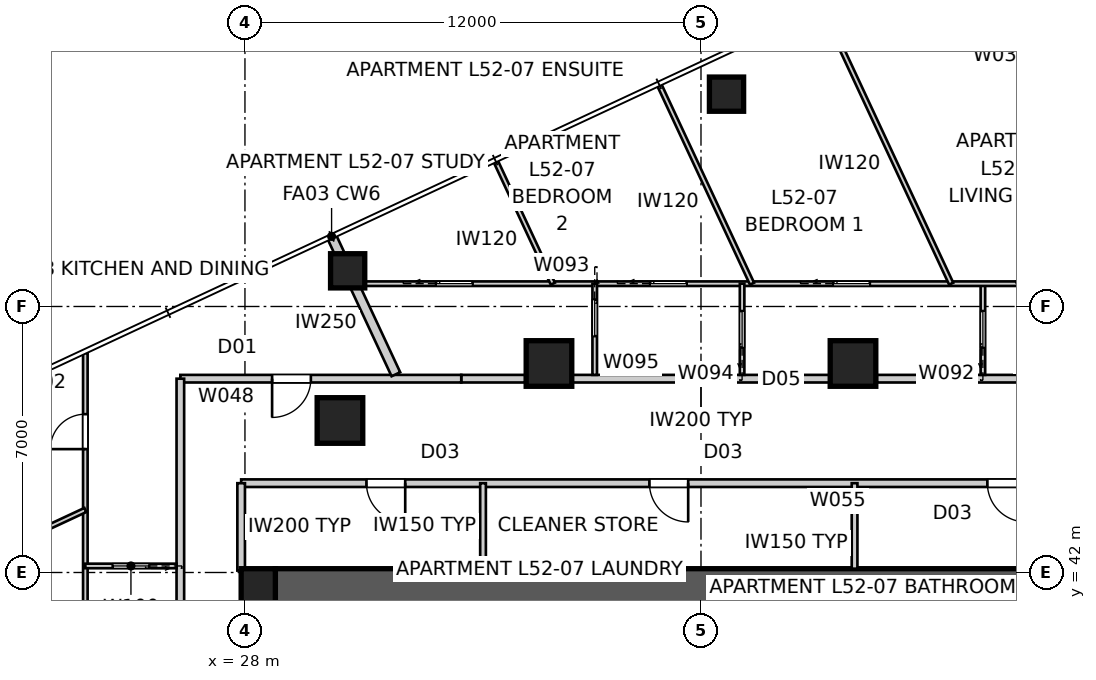
"""IFC4 building model, lengths in metres.
Left out: names, types, materials, properties, quantities, classifications, styles, units other than length and angle.
Written with IfcOpenShell. Run it as: python <this file> out.ifc"""

import sys

from ifc_helpers import new_model, si_unit, direction, frame, frame_2d, origin, origin_2d, place, context, subcontext, project, spatial, polyline, rectangle, outline, extrude, element, fill, save


model = new_model("IFC4")
c1 = context("Model", 3, precision=1e-05, world=origin(), true_north=direction((0.0, 1.0)))
c2 = subcontext(c1, "Body", "Model", "MODEL_VIEW")
j1 = project(units=[si_unit("LENGTHUNIT", "METRE"), si_unit("PLANEANGLEUNIT", "RADIAN")], contexts=[c1])
p1 = place(None, origin())
s1 = spatial("IfcSite", under=j1, at=p1, CompositionType="ELEMENT")
p2 = place(p1, origin())
s2 = spatial("IfcBuilding", under=s1, at=p2, CompositionType="ELEMENT")
p3 = place(p2, frame((0.0, 0.0, 189.6)))
s3 = spatial("IfcBuildingStorey", under=s2, at=p3, CompositionType="ELEMENT", Elevation=189.6)
p4 = place(p3, frame((28.8, 41.65, 0.0), z_axis=(0.0, 0.0, 1.0), x_axis=(1.0, 0.0, 0.0)))
e1 = element("IfcWall", 1, at=p4, inside=s3, PredefinedType="SHEAR", context=c2, shape_type="SweptSolid", body=[
    extrude(outline(polyline([(0.0, -0.45), (22.4, -0.45), (22.4, -0.025), (22.85, -0.025), (22.85, 0.025), (22.4, 0.025), (22.4, 0.45), (0.0, 0.45), (0.0, 0.025), (-0.45, 0.025), (-0.45, -0.025), (0.0, -0.025), (0.0, -0.45)])), origin(), (0.0, 0.0, 1.0), 3.4),
])
p5 = place(p3, frame((28.35, 41.2, 0.0), z_axis=(0.0, 0.0, 1.0), x_axis=(0.0, -1.0, 0.0)))
e2 = element("IfcWall", 2, at=p5, inside=s3, PredefinedType="SHEAR", context=c2, shape_type="SweptSolid", body=[
    extrude(outline(polyline([(0.0, -0.45), (22.4, -0.45), (22.4, -0.025), (22.85, -0.025), (22.85, 0.025), (22.4, 0.025), (22.4, 0.45), (0.0, 0.45), (0.0, 0.025), (-0.45, 0.025), (-0.45, -0.025), (0.0, -0.025), (0.0, -0.45)])), origin(), (0.0, 0.0, 1.0), 3.4),
])
p6 = place(p5, frame((11.14, 0.0, 0.0)))
e3 = element("IfcOpeningElement", 3, at=p6, cuts=e2, PredefinedType="OPENING", context=c2, shape_type="SweptSolid", body=[
    extrude(rectangle(XDim=1.02, YDim=2.4, at=frame_2d((0.51, 1.2))), frame((0.0, 0.46, 0.0), z_axis=(0.0, -1.0, 0.0), x_axis=(1.0, 0.0, 0.0)), (0.0, 0.0, 1.0), 0.92),
])
for number, where, z_axis, x_axis in (
    (4, (28.35, 41.65, 0.0), (0.0, 0.0, 1.0), (1.0, 0.0, 0.0)),
    (5, (40.672, 54.588, 0.0), (0.0, 0.0, 1.0), (1.0, 0.0, 0.0)),
    (6, (30.702, 49.939, 0.0), (0.0, 0.0, 1.0), (1.0, 0.0, 0.0)),
):
    element("IfcColumn", number, at=place(p3, frame(where, z_axis=z_axis, x_axis=x_axis)), inside=s3, PredefinedType="COLUMN", context=c2, shape_type="SweptSolid", body=[
        extrude(rectangle(XDim=0.9, YDim=0.9, at=origin_2d()), origin(), (0.0, 0.0, 1.0), 3.4),
    ])
for number, where, z_axis, x_axis in (
    (7, (44.0, 47.5, 0.0), (0.0, 0.0, 1.0), (1.0, 0.0, 0.0)),
    (8, (36.0, 47.5, 0.0), (0.0, 0.0, 1.0), (1.0, 0.0, 0.0)),
    (9, (30.5, 46.0, 0.0), (0.0, 0.0, 1.0), (1.0, 0.0, 0.0)),
):
    element("IfcColumn", number, at=place(p3, frame(where, z_axis=z_axis, x_axis=x_axis)), inside=s3, PredefinedType="COLUMN", context=c2, shape_type="SweptSolid", body=[
        extrude(rectangle(XDim=1.2, YDim=1.2, at=origin_2d()), origin(), (0.0, 0.0, 1.0), 3.4),
    ])
p7 = place(p3, frame((49.19, 55.25, 0.0), z_axis=(0.0, 0.0, 1.0), x_axis=(-0.422658246362, 0.906289140828, 0.0)))
e10 = element("IfcWall", 10, at=p7, inside=s3, PredefinedType="SOLIDWALL", context=c2, shape_type="SweptSolid", body=[
    extrude(rectangle(XDim=4.0, YDim=0.2, at=frame_2d((2.0, 0.0))), origin(), (0.0, 0.0, 1.0), 3.25),
])
p8 = place(p7, frame((1.0, 0.0, 0.45)))
e11 = element("IfcOpeningElement", 11, at=p8, cuts=e10, PredefinedType="OPENING", context=c2, shape_type="SweptSolid", body=[
    extrude(rectangle(XDim=2.0, YDim=1.8, at=frame_2d((1.0, 0.9))), frame((0.0, 0.11, 0.0), z_axis=(0.0, -1.0, 0.0), x_axis=(1.0, 0.0, 0.0)), (0.0, 0.0, 1.0), 0.22),
])
p9 = place(p3, frame((53.7, 47.1, 0.0), z_axis=(0.0, 0.0, 1.0), x_axis=(-1.0, 0.0, 0.0)))
e12 = element("IfcWall", 12, at=p9, inside=s3, PredefinedType="PARTITIONING", context=c2, shape_type="SweptSolid", body=[
    extrude(rectangle(XDim=7.392, YDim=0.2, at=frame_2d((3.696, 0.0))), origin(), (0.0, 0.0, 1.0), 3.25),
])
p10 = place(p9, frame((2.506, 0.0, 0.0)))
e13 = element("IfcOpeningElement", 13, at=p10, cuts=e12, PredefinedType="OPENING", context=c2, shape_type="SweptSolid", body=[
    extrude(rectangle(XDim=1.02, YDim=2.34, at=frame_2d((0.51, 1.17))), frame((0.0, 0.11, 0.0), z_axis=(0.0, -1.0, 0.0), x_axis=(1.0, 0.0, 0.0)), (0.0, 0.0, 1.0), 0.22),
])
p11 = place(p3, frame((46.308, 47.1, 0.0), z_axis=(0.0, 0.0, 1.0), x_axis=(-1.0, 0.0, 0.0)))
e14 = element("IfcWall", 14, at=p11, inside=s3, PredefinedType="PARTITIONING", context=c2, shape_type="SweptSolid", body=[
    extrude(rectangle(XDim=1.683, YDim=0.2, at=frame_2d((0.842, 0.0))), origin(), (0.0, 0.0, 1.0), 2.55),
])
p12 = place(p3, frame((44.625, 47.1, 0.0), z_axis=(0.0, 0.0, 1.0), x_axis=(-1.0, 0.0, 0.0)))
e15 = element("IfcWall", 15, at=p12, inside=s3, PredefinedType="PARTITIONING", context=c2, shape_type="SweptSolid", body=[
    extrude(rectangle(XDim=9.25, YDim=0.2, at=frame_2d((4.625, 0.0))), origin(), (0.0, 0.0, 1.0), 3.25),
])
p13 = place(p3, frame((35.375, 47.1, 0.0), z_axis=(0.0, 0.0, 1.0), x_axis=(-1.0, 0.0, 0.0)))
e16 = element("IfcWall", 16, at=p13, inside=s3, PredefinedType="PARTITIONING", context=c2, shape_type="SweptSolid", body=[
    extrude(rectangle(XDim=1.683, YDim=0.2, at=frame_2d((0.842, 0.0))), origin(), (0.0, 0.0, 1.0), 2.55),
])
p14 = place(p3, frame((33.692, 47.1, 0.0), z_axis=(0.0, 0.0, 1.0), x_axis=(-1.0, 0.0, 0.0)))
e17 = element("IfcWall", 17, at=p14, inside=s3, PredefinedType="PARTITIONING", context=c2, shape_type="SweptSolid", body=[
    extrude(rectangle(XDim=7.392, YDim=0.2, at=frame_2d((3.696, 0.0))), origin(), (0.0, 0.0, 1.0), 3.25),
])
p15 = place(p14, frame((3.957, 0.0, 0.0)))
e18 = element("IfcOpeningElement", 18, at=p15, cuts=e17, PredefinedType="OPENING", context=c2, shape_type="SweptSolid", body=[
    extrude(rectangle(XDim=1.02, YDim=2.34, at=frame_2d((0.51, 1.17))), frame((0.0, 0.11, 0.0), z_axis=(0.0, -1.0, 0.0), x_axis=(1.0, 0.0, 0.0)), (0.0, 0.0, 1.0), 0.22),
])
p16 = place(p3, frame((26.3, 47.1, 0.0), z_axis=(0.0, 0.0, 1.0), x_axis=(0.0, -1.0, 0.0)))
e19 = element("IfcWall", 19, at=p16, inside=s3, PredefinedType="PARTITIONING", context=c2, shape_type="SweptSolid", body=[
    extrude(rectangle(XDim=33.8, YDim=0.2, at=frame_2d((16.9, 0.0))), origin(), (0.0, 0.0, 1.0), 3.25),
])
p17 = place(p16, frame((15.449, 0.0, 0.0)))
e20 = element("IfcOpeningElement", 20, at=p17, cuts=e19, PredefinedType="OPENING", context=c2, shape_type="SweptSolid", body=[
    extrude(rectangle(XDim=1.02, YDim=2.34, at=frame_2d((0.51, 1.17))), frame((0.0, 0.11, 0.0), z_axis=(0.0, -1.0, 0.0), x_axis=(1.0, 0.0, 0.0)), (0.0, 0.0, 1.0), 0.22),
])
p18 = place(p16, frame((30.883, 0.0, 0.0)))
e21 = element("IfcOpeningElement", 21, at=p18, cuts=e19, PredefinedType="OPENING", context=c2, shape_type="SweptSolid", body=[
    extrude(rectangle(XDim=1.02, YDim=2.34, at=frame_2d((0.51, 1.17))), frame((0.0, 0.11, 0.0), z_axis=(0.0, -1.0, 0.0), x_axis=(1.0, 0.0, 0.0)), (0.0, 0.0, 1.0), 0.22),
])
p19 = place(p3, frame((30.28, 50.845, 0.0), z_axis=(0.0, 0.0, 1.0), x_axis=(0.422605017068, -0.906313963011, 0.0)))
e22 = element("IfcWall", 22, at=p19, inside=s3, PredefinedType="PARTITIONING", context=c2, shape_type="SweptSolid", body=[
    extrude(rectangle(XDim=4.003, YDim=0.25, at=frame_2d((2.002, 0.0))), origin(), (0.0, 0.0, 1.0), 3.25),
])
p20 = place(p3, frame((52.1, 44.35, 0.0), z_axis=(0.0, 0.0, 1.0), x_axis=(-1.0, 0.0, 0.0)))
e23 = element("IfcWall", 23, at=p20, inside=s3, PredefinedType="PARTITIONING", context=c2, shape_type="SweptSolid", body=[
    extrude(rectangle(XDim=24.2, YDim=0.2, at=frame_2d((12.1, 0.0))), origin(), (0.0, 0.0, 1.0), 3.25),
])
p21 = place(p20, frame((12.437, 0.0, 0.0)))
e24 = element("IfcOpeningElement", 24, at=p21, cuts=e23, PredefinedType="OPENING", context=c2, shape_type="SweptSolid", body=[
    extrude(rectangle(XDim=1.02, YDim=2.1, at=frame_2d((0.51, 1.05))), frame((0.0, 0.11, 0.0), z_axis=(0.0, -1.0, 0.0), x_axis=(1.0, 0.0, 0.0)), (0.0, 0.0, 1.0), 0.22),
])
p22 = place(p20, frame((3.544, 0.0, 0.0)))
e25 = element("IfcOpeningElement", 25, at=p22, cuts=e23, PredefinedType="OPENING", context=c2, shape_type="SweptSolid", body=[
    extrude(rectangle(XDim=1.02, YDim=2.1, at=frame_2d((0.51, 1.05))), frame((0.0, 0.11, 0.0), z_axis=(0.0, -1.0, 0.0), x_axis=(1.0, 0.0, 0.0)), (0.0, 0.0, 1.0), 0.22),
])
p23 = place(p20, frame((19.883, 0.0, 0.0)))
e26 = element("IfcOpeningElement", 26, at=p23, cuts=e23, PredefinedType="OPENING", context=c2, shape_type="SweptSolid", body=[
    extrude(rectangle(XDim=1.02, YDim=2.1, at=frame_2d((0.51, 1.05))), frame((0.0, 0.11, 0.0), z_axis=(0.0, -1.0, 0.0), x_axis=(1.0, 0.0, 0.0)), (0.0, 0.0, 1.0), 0.22),
])
p24 = place(p3, frame((27.9, 44.35, 0.0), z_axis=(0.0, 0.0, 1.0), x_axis=(0.0, -1.0, 0.0)))
e27 = element("IfcWall", 27, at=p24, inside=s3, PredefinedType="PARTITIONING", context=c2, shape_type="SweptSolid", body=[
    extrude(rectangle(XDim=2.3, YDim=0.2, at=frame_2d((1.15, 0.0))), origin(), (0.0, 0.0, 1.0), 3.25),
])
p25 = place(p3, frame((34.265, 42.1, 0.0), z_axis=(0.0, 0.0, 1.0), x_axis=(0.0, 1.0, 0.0)))
e28 = element("IfcWall", 28, at=p25, inside=s3, PredefinedType="SOLIDWALL", context=c2, shape_type="SweptSolid", body=[
    extrude(rectangle(XDim=2.25, YDim=0.15, at=frame_2d((1.125, 0.0))), origin(), (0.0, 0.0, 1.0), 2.796),
])
p26 = place(p3, frame((44.042, 42.1, 0.0), z_axis=(0.0, 0.0, 1.0), x_axis=(0.0, 1.0, 0.0)))
e29 = element("IfcWall", 29, at=p26, inside=s3, PredefinedType="SOLIDWALL", context=c2, shape_type="SweptSolid", body=[
    extrude(rectangle(XDim=2.25, YDim=0.15, at=frame_2d((1.125, 0.0))), origin(), (0.0, 0.0, 1.0), 3.25),
])
p27 = place(p3, frame((23.8, 17.205, 0.0), z_axis=(0.0, 0.0, 1.0), x_axis=(0.0, 1.0, 0.0)))
e30 = element("IfcWall", 30, at=p27, inside=s3, PredefinedType="PARTITIONING", context=c2, shape_type="SweptSolid", body=[
    extrude(rectangle(XDim=30.574, YDim=0.12, at=frame_2d((15.287, 0.0))), origin(), (0.0, 0.0, 1.0), 2.55),
])
p28 = place(p27, frame((12.857, 0.0, 0.0)))
e31 = element("IfcOpeningElement", 31, at=p28, cuts=e30, PredefinedType="OPENING", context=c2, shape_type="SweptSolid", body=[
    extrude(rectangle(XDim=0.92, YDim=2.34, at=frame_2d((0.46, 1.17))), frame((0.0, 0.07, 0.0), z_axis=(0.0, -1.0, 0.0), x_axis=(1.0, 0.0, 0.0)), (0.0, 0.0, 1.0), 0.14),
])
p29 = place(p27, frame((28.042, 0.0, 0.0)))
e32 = element("IfcOpeningElement", 32, at=p29, cuts=e30, PredefinedType="OPENING", context=c2, shape_type="SweptSolid", body=[
    extrude(rectangle(XDim=0.92, YDim=2.34, at=frame_2d((0.46, 1.17))), frame((0.0, 0.07, 0.0), z_axis=(0.0, -1.0, 0.0), x_axis=(1.0, 0.0, 0.0)), (0.0, 0.0, 1.0), 0.14),
])
p30 = place(p27, frame((20.655, 0.0, 0.0)))
e33 = element("IfcOpeningElement", 33, at=p30, cuts=e30, PredefinedType="OPENING", context=c2, shape_type="SweptSolid", body=[
    extrude(rectangle(XDim=0.96, YDim=2.1, at=frame_2d((0.48, 1.05))), frame((0.0, 0.07, 0.0), z_axis=(0.0, -1.0, 0.0), x_axis=(1.0, 0.0, 0.0)), (0.0, 0.0, 1.0), 0.14),
])
p31 = place(p3, frame((47.418, 47.2, 0.0), z_axis=(0.0, 0.0, 1.0), x_axis=(0.0, 1.0, 0.0)))
e34 = element("IfcWall", 34, at=p31, inside=s3, PredefinedType="PARTITIONING", context=c2, shape_type="SweptSolid", body=[
    extrude(rectangle(XDim=2.4, YDim=0.12, at=frame_2d((1.2, 0.0))), origin(), (0.0, 0.0, 1.0), 3.25),
])
p32 = place(p31, frame((0.72, 0.0, 0.0)))
e35 = element("IfcOpeningElement", 35, at=p32, cuts=e34, PredefinedType="OPENING", context=c2, shape_type="SweptSolid", body=[
    extrude(rectangle(XDim=0.96, YDim=2.1, at=frame_2d((0.48, 1.05))), frame((0.0, 0.07, 0.0), z_axis=(0.0, -1.0, 0.0), x_axis=(1.0, 0.0, 0.0)), (0.0, 0.0, 1.0), 0.14),
])
p33 = place(p3, frame((30.86, 49.6, 0.0), z_axis=(0.0, 0.0, 1.0), x_axis=(1.0, 0.0, 0.0)))
e36 = element("IfcWall", 36, at=p33, inside=s3, PredefinedType="PARTITIONING", context=c2, shape_type="SweptSolid", body=[
    extrude(rectangle(XDim=25.333, YDim=0.12, at=frame_2d((12.667, 0.0))), origin(), (0.0, 0.0, 1.0), 3.25),
])
p34 = place(p33, frame((20.877, 0.0, 0.0)))
e37 = element("IfcOpeningElement", 37, at=p34, cuts=e36, PredefinedType="OPENING", context=c2, shape_type="SweptSolid", body=[
    extrude(rectangle(XDim=0.92, YDim=2.34, at=frame_2d((0.46, 1.17))), frame((0.0, 0.07, 0.0), z_axis=(0.0, -1.0, 0.0), x_axis=(1.0, 0.0, 0.0)), (0.0, 0.0, 1.0), 0.14),
])
p35 = place(p33, frame((12.623, 0.0, 0.0)))
e38 = element("IfcOpeningElement", 38, at=p35, cuts=e36, PredefinedType="OPENING", context=c2, shape_type="SweptSolid", body=[
    extrude(rectangle(XDim=0.96, YDim=2.1, at=frame_2d((0.48, 1.05))), frame((0.0, 0.07, 0.0), z_axis=(0.0, -1.0, 0.0), x_axis=(1.0, 0.0, 0.0)), (0.0, 0.0, 1.0), 0.14),
])
p36 = place(p33, frame((7.802, 0.0, 0.0)))
e39 = element("IfcOpeningElement", 39, at=p36, cuts=e36, PredefinedType="OPENING", context=c2, shape_type="SweptSolid", body=[
    extrude(rectangle(XDim=0.96, YDim=2.1, at=frame_2d((0.48, 1.05))), frame((0.0, 0.07, 0.0), z_axis=(0.0, -1.0, 0.0), x_axis=(1.0, 0.0, 0.0)), (0.0, 0.0, 1.0), 0.14),
])
p37 = place(p33, frame((2.168, 0.0, 0.0)))
e40 = element("IfcOpeningElement", 40, at=p37, cuts=e36, PredefinedType="OPENING", context=c2, shape_type="SweptSolid", body=[
    extrude(rectangle(XDim=0.96, YDim=2.1, at=frame_2d((0.48, 1.05))), frame((0.0, 0.07, 0.0), z_axis=(0.0, -1.0, 0.0), x_axis=(1.0, 0.0, 0.0)), (0.0, 0.0, 1.0), 0.14),
])
p38 = place(p3, frame((41.082, 47.2, 0.0), z_axis=(0.0, 0.0, 1.0), x_axis=(0.0, 1.0, 0.0)))
e41 = element("IfcWall", 41, at=p38, inside=s3, PredefinedType="PARTITIONING", context=c2, shape_type="SweptSolid", body=[
    extrude(rectangle(XDim=2.4, YDim=0.12, at=frame_2d((1.2, 0.0))), origin(), (0.0, 0.0, 1.0), 3.25),
])
p39 = place(p38, frame((0.72, 0.0, 0.0)))
e42 = element("IfcOpeningElement", 42, at=p39, cuts=e41, PredefinedType="OPENING", context=c2, shape_type="SweptSolid", body=[
    extrude(rectangle(XDim=0.96, YDim=2.1, at=frame_2d((0.48, 1.05))), frame((0.0, 0.07, 0.0), z_axis=(0.0, -1.0, 0.0), x_axis=(1.0, 0.0, 0.0)), (0.0, 0.0, 1.0), 0.14),
])
p40 = place(p3, frame((37.204, 49.6, 0.0), z_axis=(0.0, 0.0, 1.0), x_axis=(0.0, -1.0, 0.0)))
e43 = element("IfcWall", 43, at=p40, inside=s3, PredefinedType="PARTITIONING", context=c2, shape_type="SweptSolid", body=[
    extrude(rectangle(XDim=2.4, YDim=0.12, at=frame_2d((1.2, 0.0))), origin(), (0.0, 0.0, 1.0), 3.25),
])
p41 = place(p40, frame((0.42, 0.0, 0.0)))
e44 = element("IfcOpeningElement", 44, at=p41, cuts=e43, PredefinedType="OPENING", context=c2, shape_type="SweptSolid", body=[
    extrude(rectangle(XDim=0.96, YDim=2.1, at=frame_2d((0.48, 1.05))), frame((0.0, 0.07, 0.0), z_axis=(0.0, -1.0, 0.0), x_axis=(1.0, 0.0, 0.0)), (0.0, 0.0, 1.0), 0.14),
])
p42 = place(p3, frame((46.583, 49.6, 0.0), z_axis=(0.0, 0.0, 1.0), x_axis=(-0.422640876946, 0.90629724105, 0.0)))
e45 = element("IfcWall", 45, at=p42, inside=s3, PredefinedType="PARTITIONING", context=c2, shape_type="SweptSolid", body=[
    extrude(rectangle(XDim=7.979, YDim=0.12, at=frame_2d((3.989, 0.0))), origin(), (0.0, 0.0, 1.0), 3.25),
])
p43 = place(p3, frame((54.787, 52.618, 0.0), z_axis=(0.0, 0.0, 1.0), x_axis=(-0.906317589158, -0.422597240388, 0.0)))
e46 = element("IfcWall", 46, at=p43, inside=s3, PredefinedType="PARTITIONING", context=c2, shape_type="SweptSolid", body=[
    extrude(rectangle(XDim=7.142, YDim=0.12, at=frame_2d((3.571, 0.0))), origin(), (0.0, 0.0, 1.0), 3.25),
])
p44 = place(p43, frame((3.091, 0.0, 0.0)))
e47 = element("IfcOpeningElement", 47, at=p44, cuts=e46, PredefinedType="OPENING", context=c2, shape_type="SweptSolid", body=[
    extrude(rectangle(XDim=0.92, YDim=2.34, at=frame_2d((0.46, 1.17))), frame((0.0, 0.07, 0.0), z_axis=(0.0, -1.0, 0.0), x_axis=(1.0, 0.0, 0.0)), (0.0, 0.0, 1.0), 0.14),
])
p45 = place(p3, frame((41.343, 49.6, 0.0), z_axis=(0.0, 0.0, 1.0), x_axis=(-0.422648925879, 0.906293487483, 0.0)))
e48 = element("IfcWall", 48, at=p45, inside=s3, PredefinedType="PARTITIONING", context=c2, shape_type="SweptSolid", body=[
    extrude(rectangle(XDim=5.764, YDim=0.12, at=frame_2d((2.882, 0.0))), origin(), (0.0, 0.0, 1.0), 3.25),
])
p46 = place(p3, frame((36.101, 49.6, 0.0), z_axis=(0.0, 0.0, 1.0), x_axis=(-0.42263686638, 0.906299111318, 0.0)))
e49 = element("IfcWall", 49, at=p46, inside=s3, PredefinedType="PARTITIONING", context=c2, shape_type="SweptSolid", body=[
    extrude(rectangle(XDim=3.549, YDim=0.12, at=frame_2d((1.774, 0.0))), origin(), (0.0, 0.0, 1.0), 3.25),
])
p47 = place(p3, frame((26.2, 42.172, 0.0), z_axis=(0.0, 0.0, 1.0), x_axis=(-1.0, 0.0, 0.0)))
e50 = element("IfcWall", 50, at=p47, inside=s3, PredefinedType="PARTITIONING", context=c2, shape_type="SweptSolid", body=[
    extrude(rectangle(XDim=2.4, YDim=0.12, at=frame_2d((1.2, 0.0))), origin(), (0.0, 0.0, 1.0), 3.25),
])
p48 = place(p47, frame((0.72, 0.0, 0.0)))
e51 = element("IfcOpeningElement", 51, at=p48, cuts=e50, PredefinedType="OPENING", context=c2, shape_type="SweptSolid", body=[
    extrude(rectangle(XDim=0.96, YDim=2.1, at=frame_2d((0.48, 1.05))), frame((0.0, 0.07, 0.0), z_axis=(0.0, -1.0, 0.0), x_axis=(1.0, 0.0, 0.0)), (0.0, 0.0, 1.0), 0.14),
])
p49 = place(p3, frame((14.697, 39.4, 0.0), z_axis=(0.0, 0.0, 1.0), x_axis=(0.906300466163, 0.422633961049, 0.0)))
e52 = element("IfcWall", 52, at=p49, inside=s3, PredefinedType="PARTITIONING", context=c2, shape_type="SweptSolid", body=[
    extrude(rectangle(XDim=10.044, YDim=0.12, at=frame_2d((5.022, 0.0))), origin(), (0.0, 0.0, 1.0), 3.25),
])
p50 = place(p49, frame((1.9, 0.0, 0.0)))
e53 = element("IfcOpeningElement", 53, at=p50, cuts=e52, PredefinedType="OPENING", context=c2, shape_type="SweptSolid", body=[
    extrude(rectangle(XDim=0.92, YDim=2.34, at=frame_2d((0.46, 1.17))), frame((0.0, 0.07, 0.0), z_axis=(0.0, -1.0, 0.0), x_axis=(1.0, 0.0, 0.0)), (0.0, 0.0, 1.0), 0.14),
])
p51 = place(p21, origin())
e54 = element("IfcDoor", 54, at=p51, inside=s3, OperationType="SINGLE_SWING_LEFT", PredefinedType="DOOR", context=c2, shape_type="SweptSolid", body=[
    extrude(rectangle(XDim=1.02, YDim=2.1, at=frame_2d((0.51, 1.05))), frame((0.0, 0.025, 0.0), z_axis=(0.0, -1.0, 0.0), x_axis=(1.0, 0.0, 0.0)), (0.0, 0.0, 1.0), 0.05),
])
fill(e24, e54)
p52 = place(p22, origin())
e55 = element("IfcDoor", 55, at=p52, inside=s3, OperationType="SINGLE_SWING_LEFT", PredefinedType="DOOR", context=c2, shape_type="SweptSolid", body=[
    extrude(rectangle(XDim=1.02, YDim=2.1, at=frame_2d((0.51, 1.05))), frame((0.0, 0.025, 0.0), z_axis=(0.0, -1.0, 0.0), x_axis=(1.0, 0.0, 0.0)), (0.0, 0.0, 1.0), 0.05),
])
fill(e25, e55)
p53 = place(p23, origin())
e56 = element("IfcDoor", 56, at=p53, inside=s3, OperationType="SINGLE_SWING_LEFT", PredefinedType="DOOR", context=c2, shape_type="SweptSolid", body=[
    extrude(rectangle(XDim=1.02, YDim=2.1, at=frame_2d((0.51, 1.05))), frame((0.0, 0.025, 0.0), z_axis=(0.0, -1.0, 0.0), x_axis=(1.0, 0.0, 0.0)), (0.0, 0.0, 1.0), 0.05),
])
fill(e26, e56)
p54 = place(p15, origin())
e57 = element("IfcDoor", 57, at=p54, inside=s3, OperationType="SINGLE_SWING_RIGHT", PredefinedType="DOOR", context=c2, shape_type="SweptSolid", body=[
    extrude(rectangle(XDim=1.02, YDim=2.34, at=frame_2d((0.51, 1.17))), frame((0.0, 0.025, 0.0), z_axis=(0.0, -1.0, 0.0), x_axis=(1.0, 0.0, 0.0)), (0.0, 0.0, 1.0), 0.05),
])
fill(e18, e57)
p55 = place(p32, origin())
e58 = element("IfcDoor", 58, at=p55, inside=s3, OperationType="SLIDING_TO_LEFT", PredefinedType="DOOR", context=c2, shape_type="SweptSolid", body=[
    extrude(rectangle(XDim=0.96, YDim=2.1, at=frame_2d((0.48, 1.05))), frame((0.0, 0.025, 0.0), z_axis=(0.0, -1.0, 0.0), x_axis=(1.0, 0.0, 0.0)), (0.0, 0.0, 1.0), 0.05),
])
fill(e35, e58)
p56 = place(p29, origin())
e59 = element("IfcDoor", 59, at=p56, inside=s3, OperationType="SINGLE_SWING_LEFT", PredefinedType="DOOR", context=c2, shape_type="SweptSolid", body=[
    extrude(rectangle(XDim=0.92, YDim=2.34, at=frame_2d((0.46, 1.17))), frame((0.0, 0.025, 0.0), z_axis=(0.0, -1.0, 0.0), x_axis=(1.0, 0.0, 0.0)), (0.0, 0.0, 1.0), 0.05),
])
fill(e32, e59)
p57 = place(p48, origin())
e60 = element("IfcDoor", 60, at=p57, inside=s3, OperationType="SLIDING_TO_LEFT", PredefinedType="DOOR", context=c2, shape_type="SweptSolid", body=[
    extrude(rectangle(XDim=0.96, YDim=2.1, at=frame_2d((0.48, 1.05))), frame((0.0, 0.025, 0.0), z_axis=(0.0, -1.0, 0.0), x_axis=(1.0, 0.0, 0.0)), (0.0, 0.0, 1.0), 0.05),
])
fill(e51, e60)
p58 = place(p35, origin())
e61 = element("IfcDoor", 61, at=p58, inside=s3, OperationType="SLIDING_TO_LEFT", PredefinedType="DOOR", context=c2, shape_type="SweptSolid", body=[
    extrude(rectangle(XDim=0.96, YDim=2.1, at=frame_2d((0.48, 1.05))), frame((0.0, 0.025, 0.0), z_axis=(0.0, -1.0, 0.0), x_axis=(1.0, 0.0, 0.0)), (0.0, 0.0, 1.0), 0.05),
])
fill(e38, e61)
p59 = place(p39, origin())
e62 = element("IfcDoor", 62, at=p59, inside=s3, OperationType="SLIDING_TO_LEFT", PredefinedType="DOOR", context=c2, shape_type="SweptSolid", body=[
    extrude(rectangle(XDim=0.96, YDim=2.1, at=frame_2d((0.48, 1.05))), frame((0.0, 0.025, 0.0), z_axis=(0.0, -1.0, 0.0), x_axis=(1.0, 0.0, 0.0)), (0.0, 0.0, 1.0), 0.05),
])
fill(e42, e62)
p60 = place(p36, origin())
e63 = element("IfcDoor", 63, at=p60, inside=s3, OperationType="SLIDING_TO_LEFT", PredefinedType="DOOR", context=c2, shape_type="SweptSolid", body=[
    extrude(rectangle(XDim=0.96, YDim=2.1, at=frame_2d((0.48, 1.05))), frame((0.0, 0.025, 0.0), z_axis=(0.0, -1.0, 0.0), x_axis=(1.0, 0.0, 0.0)), (0.0, 0.0, 1.0), 0.05),
])
fill(e39, e63)
p61 = place(p41, origin())
e64 = element("IfcDoor", 64, at=p61, inside=s3, OperationType="SLIDING_TO_LEFT", PredefinedType="DOOR", context=c2, shape_type="SweptSolid", body=[
    extrude(rectangle(XDim=0.96, YDim=2.1, at=frame_2d((0.48, 1.05))), frame((0.0, 0.025, 0.0), z_axis=(0.0, -1.0, 0.0), x_axis=(1.0, 0.0, 0.0)), (0.0, 0.0, 1.0), 0.05),
])
fill(e44, e64)
p62 = place(p37, origin())
e65 = element("IfcDoor", 65, at=p62, inside=s3, OperationType="SLIDING_TO_LEFT", PredefinedType="DOOR", context=c2, shape_type="SweptSolid", body=[
    extrude(rectangle(XDim=0.96, YDim=2.1, at=frame_2d((0.48, 1.05))), frame((0.0, 0.025, 0.0), z_axis=(0.0, -1.0, 0.0), x_axis=(1.0, 0.0, 0.0)), (0.0, 0.0, 1.0), 0.05),
])
fill(e40, e65)
save(model, sys.argv[1])
